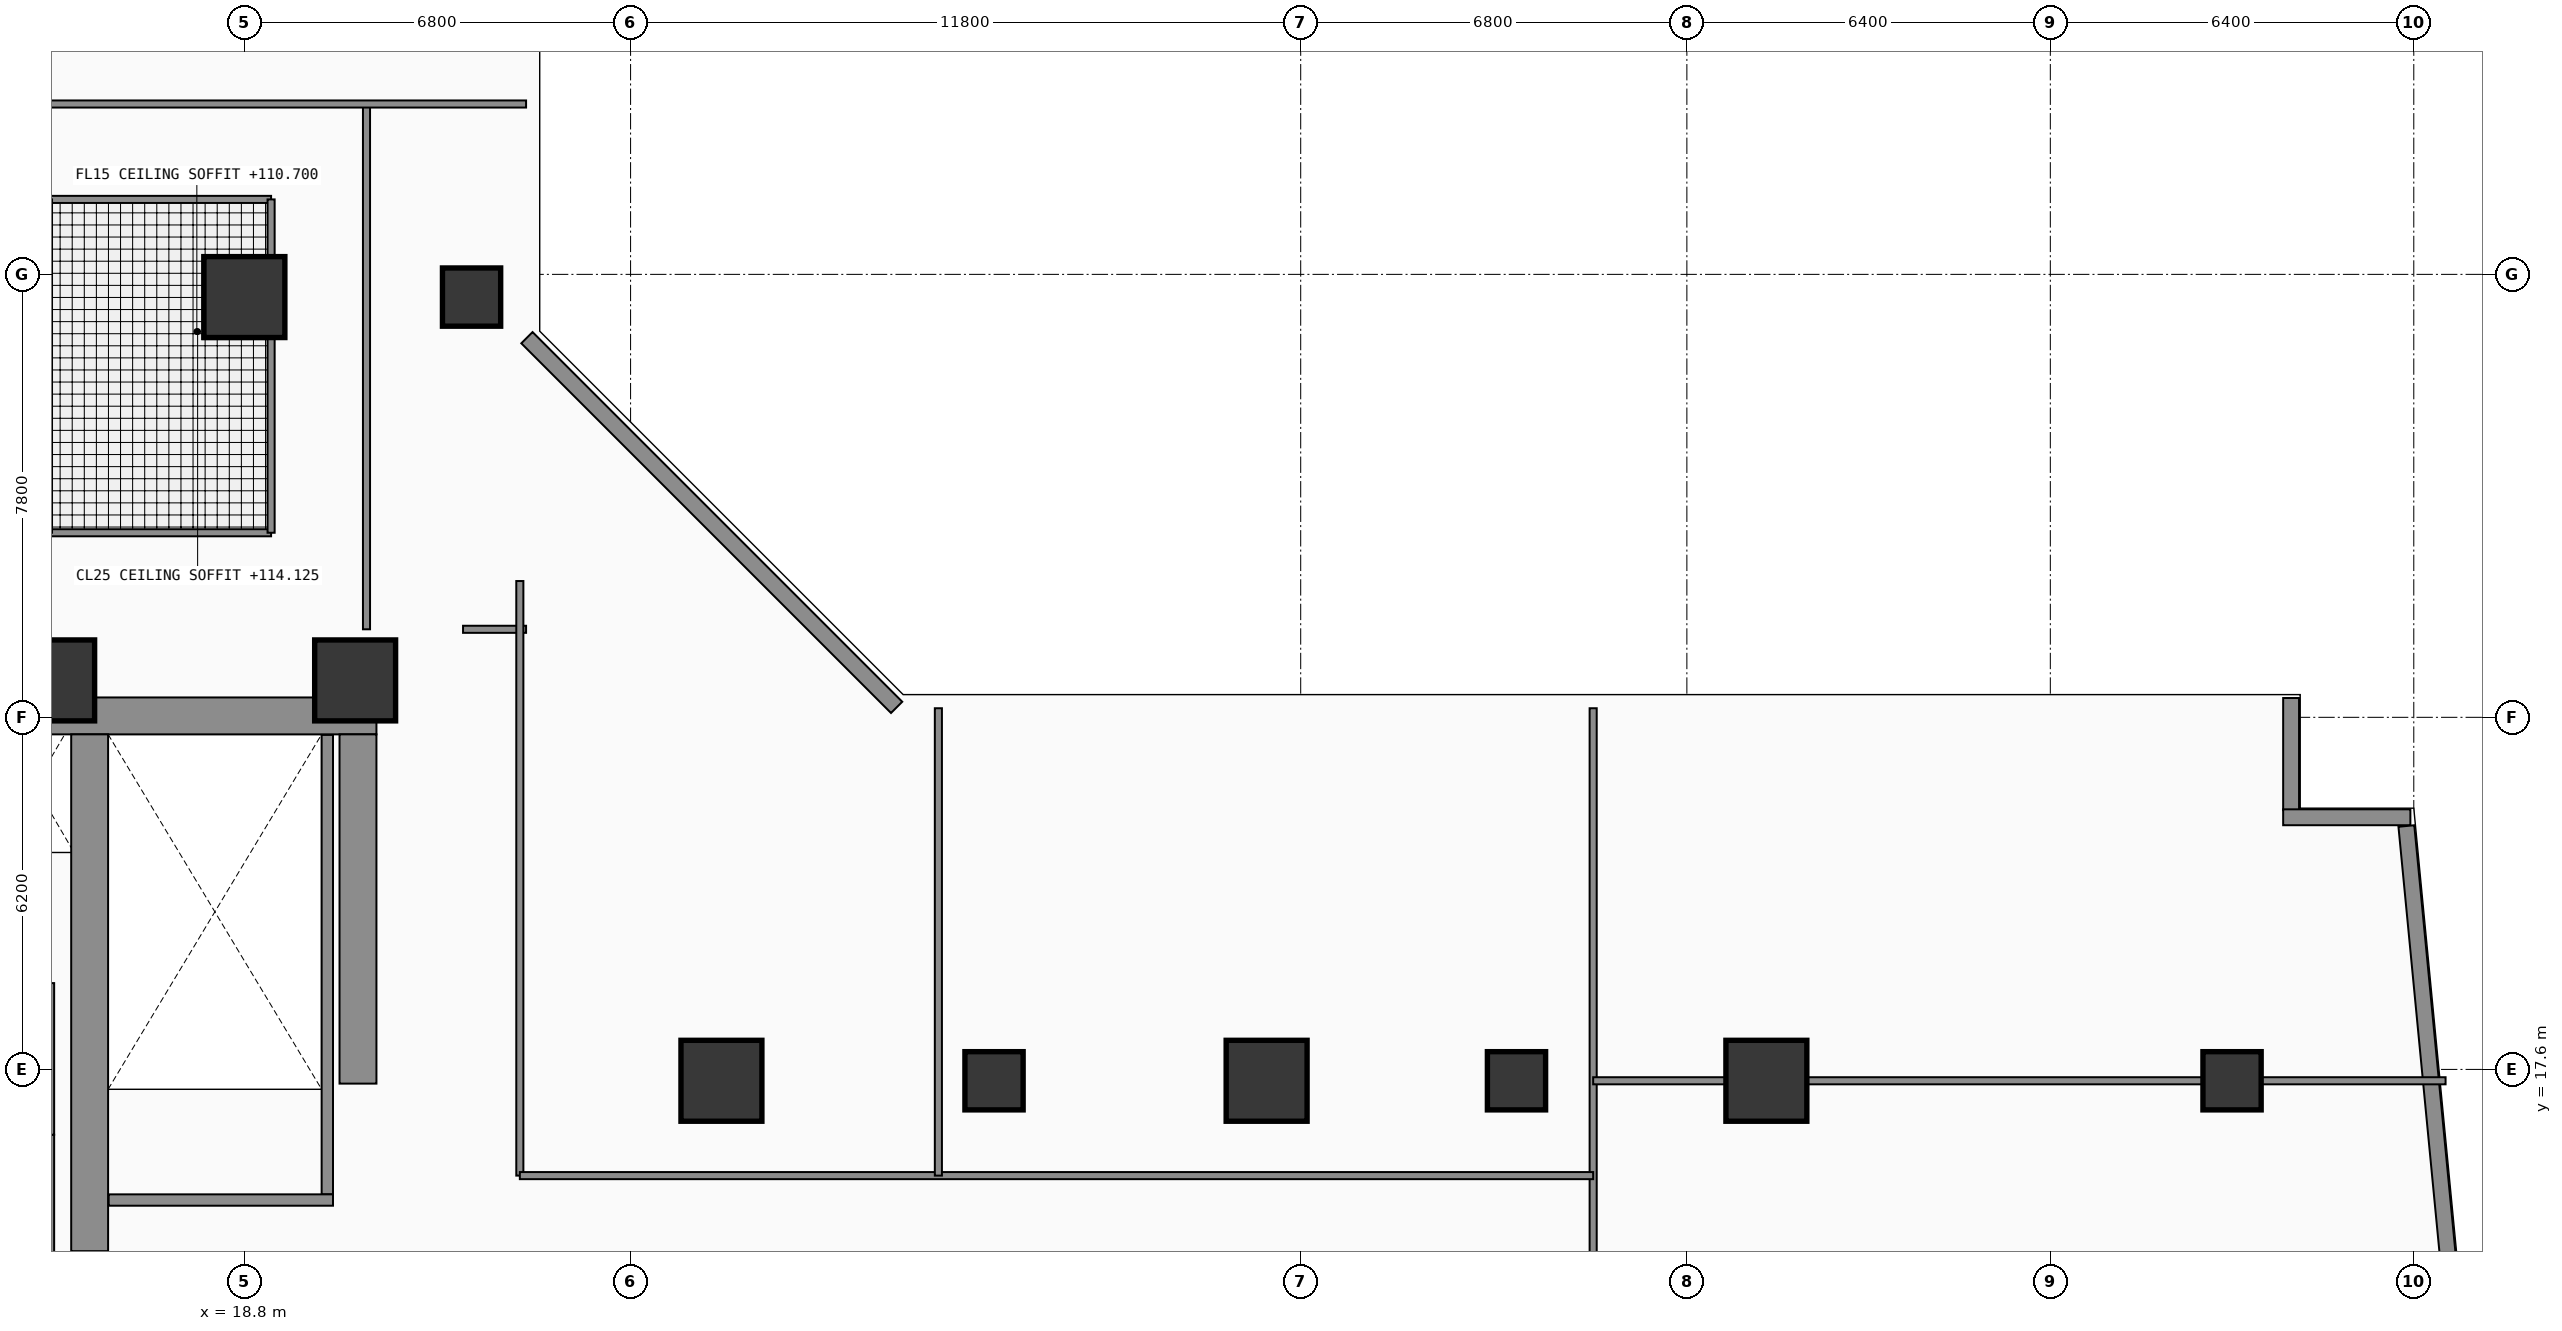
"""IFC4 building model, lengths in metres.
Left out: names, types, materials, properties, quantities, classifications, styles, units other than length and angle.
Written with IfcOpenShell. Run it as: python <this file> out.ifc"""

import sys

from ifc_helpers import new_model, si_unit, direction, frame, frame_2d, origin, origin_2d, place, context, subcontext, project, spatial, rectangle, extrude, element, fill, save


model = new_model("IFC4")
c1 = context("Model", 3, precision=1e-05, world=origin(), true_north=direction((0.0, 1.0)))
c2 = subcontext(c1, "Body", "Model", "MODEL_VIEW")
j1 = project(units=[si_unit("LENGTHUNIT", "METRE"), si_unit("PLANEANGLEUNIT", "RADIAN")], contexts=[c1])
p1 = place(None, origin())
s1 = spatial("IfcSite", under=j1, at=p1, CompositionType="ELEMENT")
p2 = place(p1, origin())
s2 = spatial("IfcBuilding", under=s1, at=p2, CompositionType="ELEMENT")
p3 = place(p2, frame((0.0, 0.0, 110.7)))
s3 = spatial("IfcBuildingStorey", under=s2, at=p3, CompositionType="ELEMENT", Elevation=110.7)
p4 = place(p3, frame((7.125, 23.825, 0.0), z_axis=(0.0, 0.0, 1.0), x_axis=(1.0, 0.0, 0.0)))
e1 = element("IfcWall", 1, at=p4, inside=s3, PredefinedType="SHEAR", context=c2, shape_type="SweptSolid", body=[
    extrude(rectangle(XDim=14.0, YDim=0.65, at=frame_2d((7.0, 0.0))), origin(), (0.0, 0.0, 1.0), 3.54),
])
p5 = place(p3, frame((20.8, 17.35, 0.0), z_axis=(0.0, 0.0, 1.0), x_axis=(0.0, 1.0, 0.0)))
e2 = element("IfcWall", 2, at=p5, inside=s3, PredefinedType="SHEAR", context=c2, shape_type="SweptSolid", body=[
    extrude(rectangle(XDim=6.15, YDim=0.65, at=frame_2d((3.075, 0.0))), origin(), (0.0, 0.0, 1.0), 3.54),
])
p6 = place(p3, frame((16.075, 14.4, 0.0), z_axis=(0.0, 0.0, 1.0), x_axis=(0.0, 1.0, 0.0)))
e3 = element("IfcWall", 3, at=p6, inside=s3, PredefinedType="SHEAR", context=c2, shape_type="SweptSolid", body=[
    extrude(rectangle(XDim=9.1, YDim=0.65, at=frame_2d((4.55, 0.0))), origin(), (0.0, 0.0, 1.0), 3.54),
])
for number, where, z_axis, x_axis in (
    (4, (15.45, 24.45, 0.0), (0.0, 0.0, 1.0), (1.0, 0.0, 0.0)),
    (5, (20.75, 24.45, 0.0), (0.0, 0.0, 1.0), (1.0, 0.0, 0.0)),
    (6, (18.8, 31.2, 0.0), (0.0, 0.0, 1.0), (1.0, 0.0, 0.0)),
    (7, (27.2, 17.4, 0.0), (0.0, 0.0, 1.0), (1.0, 0.0, 0.0)),
    (8, (36.8, 17.4, 0.0), (0.0, 0.0, 1.0), (1.0, 0.0, 0.0)),
    (9, (45.6, 17.4, 0.0), (0.0, 0.0, 1.0), (1.0, 0.0, 0.0)),
):
    element("IfcColumn", number, at=place(p3, frame(where, z_axis=z_axis, x_axis=x_axis)), inside=s3, PredefinedType="COLUMN", context=c2, shape_type="SweptSolid", body=[
        extrude(rectangle(XDim=1.4, YDim=1.4, at=origin_2d()), origin(), (0.0, 0.0, 1.0), 3.54),
    ])
for number, where, z_axis, x_axis in (
    (10, (53.8, 17.4, 0.0), (0.0, 0.0, 1.0), (1.0, 0.0, 0.0)),
    (11, (22.8, 31.2, 0.0), (0.0, 0.0, 1.0), (1.0, 0.0, 0.0)),
    (12, (32.0, 17.4, 0.0), (0.0, 0.0, 1.0), (1.0, 0.0, 0.0)),
    (13, (41.2, 17.4, 0.0), (0.0, 0.0, 1.0), (1.0, 0.0, 0.0)),
):
    element("IfcColumn", number, at=place(p3, frame(where, z_axis=z_axis, x_axis=x_axis)), inside=s3, PredefinedType="COLUMN", context=c2, shape_type="SweptSolid", body=[
        extrude(rectangle(XDim=1.0, YDim=1.0, at=origin_2d()), origin(), (0.0, 0.0, 1.0), 3.54),
    ])
p7 = place(p3, frame((54.84, 22.165, 0.0), z_axis=(0.0, 0.0, 1.0), x_axis=(0.0, 1.0, 0.0)))
e14 = element("IfcWall", 14, at=p7, inside=s3, PredefinedType="SOLIDWALL", context=c2, shape_type="SweptSolid", body=[
    extrude(rectangle(XDim=1.975, YDim=0.28, at=frame_2d((0.987, 0.0))), origin(), (0.0, 0.0, 1.0), 3.54),
])
p8 = place(p3, frame((54.7, 22.04, 0.0), z_axis=(0.0, 0.0, 1.0), x_axis=(1.0, 0.0, 0.0)))
e15 = element("IfcWall", 15, at=p8, inside=s3, PredefinedType="SOLIDWALL", context=c2, shape_type="SweptSolid", body=[
    extrude(rectangle(XDim=2.24, YDim=0.28, at=frame_2d((1.12, 0.0))), origin(), (0.0, 0.0, 1.0), 3.54),
])
p9 = place(p3, frame((30.285, 23.975, 0.0), z_axis=(0.0, 0.0, 1.0), x_axis=(-0.707106781187, 0.707106781187, 0.0)))
e16 = element("IfcWall", 16, at=p9, inside=s3, PredefinedType="SOLIDWALL", context=c2, shape_type="SweptSolid", body=[
    extrude(rectangle(XDim=9.207, YDim=0.28, at=frame_2d((4.603, 0.0))), origin(), (0.0, 0.0, 1.0), 3.54),
])
p10 = place(p3, frame((57.639, 13.905, 0.0), z_axis=(0.0, 0.0, 1.0), x_axis=(-0.095969995245, 0.995384227328, 0.0)))
e17 = element("IfcWall", 17, at=p10, inside=s3, PredefinedType="SOLIDWALL", context=c2, shape_type="SweptSolid", body=[
    extrude(rectangle(XDim=8.019, YDim=0.28, at=frame_2d((4.009, 0.0))), origin(), (0.0, 0.0, 1.0), 3.54),
])
p11 = place(p3, frame((20.26, 15.4, 0.0), z_axis=(0.0, 0.0, 1.0), x_axis=(0.0, 1.0, 0.0)))
e18 = element("IfcWall", 18, at=p11, inside=s3, PredefinedType="SHEAR", context=c2, shape_type="SweptSolid", body=[
    extrude(rectangle(XDim=8.09, YDim=0.2, at=frame_2d((4.045, 0.0))), origin(), (0.0, 0.0, 1.0), 3.54),
])
p12 = place(p3, frame((16.41, 15.3, 0.0), z_axis=(0.0, 0.0, 1.0), x_axis=(1.0, 0.0, 0.0)))
e19 = element("IfcWall", 19, at=p12, inside=s3, PredefinedType="PARTITIONING", context=c2, shape_type="SweptSolid", body=[
    extrude(rectangle(XDim=3.95, YDim=0.2, at=frame_2d((1.975, 0.0))), origin(), (0.0, 0.0, 1.0), 3.54),
])
p13 = place(p12, frame((1.294, 0.0, 0.0)))
e20 = element("IfcOpeningElement", 20, at=p13, cuts=e19, PredefinedType="OPENING", context=c2, shape_type="SweptSolid", body=[
    extrude(rectangle(XDim=1.1, YDim=2.2, at=frame_2d((0.55, 1.1))), frame((0.0, 0.11, 0.0), z_axis=(0.0, -1.0, 0.0), x_axis=(1.0, 0.0, 0.0)), (0.0, 0.0, 1.0), 0.22),
])
p14 = place(p3, frame((15.35, 14.22, 0.0), z_axis=(0.0, 0.0, 1.0), x_axis=(0.0, 1.0, 0.0)))
e21 = element("IfcWall", 21, at=p14, inside=s3, PredefinedType="PARTITIONING", context=c2, shape_type="SweptSolid", body=[
    extrude(rectangle(XDim=2.23, YDim=0.2, at=frame_2d((1.115, 0.0))), origin(), (0.0, 0.0, 1.0), 3.54),
])
p15 = place(p3, frame((15.35, 16.45, 0.0), z_axis=(0.0, 0.0, 1.0), x_axis=(0.0, 1.0, 0.0)))
e22 = element("IfcWall", 22, at=p15, inside=s3, PredefinedType="PARTITIONING", context=c2, shape_type="SweptSolid", body=[
    extrude(rectangle(XDim=2.67, YDim=0.2, at=frame_2d((1.335, 0.0))), origin(), (0.0, 0.0, 1.0), 3.54),
])
for number, where, z_axis, x_axis in (
    (23, (15.35, 27.05, 0.0), (0.0, 0.0, 1.0), (1.0, 0.0, 0.0)),
    (24, (15.35, 32.92, 0.0), (0.0, 0.0, 1.0), (1.0, 0.0, 0.0)),
):
    element("IfcWall", number, at=place(p3, frame(where, z_axis=z_axis, x_axis=x_axis)), inside=s3, PredefinedType="PARTITIONING", context=c2, shape_type="SweptSolid", body=[
        extrude(rectangle(XDim=3.92, YDim=0.125, at=frame_2d((1.96, 0.0))), origin(), (0.0, 0.0, 1.0), 3.54),
    ])
p16 = place(p3, frame((19.27, 27.05, 0.0), z_axis=(0.0, 0.0, 1.0), x_axis=(0.0, 1.0, 0.0)))
e25 = element("IfcWall", 25, at=p16, inside=s3, PredefinedType="PARTITIONING", context=c2, shape_type="SweptSolid", body=[
    extrude(rectangle(XDim=5.87, YDim=0.125, at=frame_2d((2.935, 0.0))), origin(), (0.0, 0.0, 1.0), 3.54),
])
p17 = place(p16, frame((2.106, 0.0, 0.0)))
e26 = element("IfcOpeningElement", 26, at=p17, cuts=e25, PredefinedType="OPENING", context=c2, shape_type="SweptSolid", body=[
    extrude(rectangle(XDim=0.95, YDim=2.15, at=frame_2d((0.475, 1.075))), frame((0.0, 0.073, 0.0), z_axis=(0.0, -1.0, 0.0), x_axis=(1.0, 0.0, 0.0)), (0.0, 0.0, 1.0), 0.145),
])
p18 = place(p3, frame((20.95, 25.35, 0.0), z_axis=(0.0, 0.0, 1.0), x_axis=(0.0, 1.0, 0.0)))
e27 = element("IfcWall", 27, at=p18, inside=s3, PredefinedType="PARTITIONING", context=c2, shape_type="SweptSolid", body=[
    extrude(rectangle(XDim=9.25, YDim=0.125, at=frame_2d((4.625, 0.0))), origin(), (0.0, 0.0, 1.0), 3.54),
])
p19 = place(p18, frame((3.833, 0.0, 0.0)))
e28 = element("IfcOpeningElement", 28, at=p19, cuts=e27, PredefinedType="OPENING", context=c2, shape_type="SweptSolid", body=[
    extrude(rectangle(XDim=0.85, YDim=2.15, at=frame_2d((0.425, 1.075))), frame((0.0, 0.073, 0.0), z_axis=(0.0, -1.0, 0.0), x_axis=(1.0, 0.0, 0.0)), (0.0, 0.0, 1.0), 0.145),
])
p20 = place(p3, frame((22.65, 25.35, 0.0), z_axis=(0.0, 0.0, 1.0), x_axis=(1.0, 0.0, 0.0)))
e29 = element("IfcWall", 29, at=p20, inside=s3, PredefinedType="PARTITIONING", context=c2, shape_type="SweptSolid", body=[
    extrude(rectangle(XDim=1.11, YDim=0.125, at=frame_2d((0.555, 0.0))), origin(), (0.0, 0.0, 1.0), 3.54),
])
p21 = place(p3, frame((11.98, 34.6, 0.0), z_axis=(0.0, 0.0, 1.0), x_axis=(1.0, 0.0, 0.0)))
e30 = element("IfcWall", 30, at=p21, inside=s3, PredefinedType="PARTITIONING", context=c2, shape_type="SweptSolid", body=[
    extrude(rectangle(XDim=11.78, YDim=0.125, at=frame_2d((5.89, 0.0))), origin(), (0.0, 0.0, 1.0), 3.54),
])
p22 = place(p3, frame((42.55, 3.84, 0.0), z_axis=(0.0, 0.0, 1.0), x_axis=(0.0, 1.0, 0.0)))
e31 = element("IfcWall", 31, at=p22, inside=s3, PredefinedType="PARTITIONING", context=c2, shape_type="SweptSolid", body=[
    extrude(rectangle(XDim=20.12, YDim=0.125, at=frame_2d((10.06, 0.0))), origin(), (0.0, 0.0, 1.0), 3.54),
])
p23 = place(p22, frame((10.5, 0.0, 0.0)))
e32 = element("IfcOpeningElement", 32, at=p23, cuts=e31, PredefinedType="OPENING", context=c2, shape_type="SweptSolid", body=[
    extrude(rectangle(XDim=1.0, YDim=2.2, at=frame_2d((0.5, 1.1))), frame((0.0, 0.073, 0.0), z_axis=(0.0, -1.0, 0.0), x_axis=(1.0, 0.0, 0.0)), (0.0, 0.0, 1.0), 0.145),
])
p24 = place(p3, frame((42.55, 17.4, 0.0), z_axis=(0.0, 0.0, 1.0), x_axis=(1.0, 0.0, 0.0)))
e33 = element("IfcWall", 33, at=p24, inside=s3, PredefinedType="PARTITIONING", context=c2, shape_type="SweptSolid", body=[
    extrude(rectangle(XDim=15.01, YDim=0.125, at=frame_2d((7.505, 0.0))), origin(), (0.0, 0.0, 1.0), 3.24),
])
p25 = place(p24, frame((4.244, 0.0, 0.0)))
e34 = element("IfcOpeningElement", 34, at=p25, cuts=e33, PredefinedType="OPENING", context=c2, shape_type="SweptSolid", body=[
    extrude(rectangle(XDim=0.95, YDim=2.15, at=frame_2d((0.475, 1.075))), frame((0.0, 0.073, 0.0), z_axis=(0.0, -1.0, 0.0), x_axis=(1.0, 0.0, 0.0)), (0.0, 0.0, 1.0), 0.145),
])
p26 = place(p3, frame((23.65, 15.73, 0.0), z_axis=(0.0, 0.0, 1.0), x_axis=(0.0, 1.0, 0.0)))
e35 = element("IfcWall", 35, at=p26, inside=s3, PredefinedType="PARTITIONING", context=c2, shape_type="SweptSolid", body=[
    extrude(rectangle(XDim=10.47, YDim=0.125, at=frame_2d((5.235, 0.0))), origin(), (0.0, 0.0, 1.0), 3.54),
])
p27 = place(p3, frame((23.65, 15.73, 0.0), z_axis=(0.0, 0.0, 1.0), x_axis=(1.0, 0.0, 0.0)))
e36 = element("IfcWall", 36, at=p27, inside=s3, PredefinedType="PARTITIONING", context=c2, shape_type="SweptSolid", body=[
    extrude(rectangle(XDim=18.9, YDim=0.125, at=frame_2d((9.45, 0.0))), origin(), (0.0, 0.0, 1.0), 3.09),
])
p28 = place(p27, frame((4.615, 0.0, 0.0)))
e37 = element("IfcOpeningElement", 37, at=p28, cuts=e36, PredefinedType="OPENING", context=c2, shape_type="SweptSolid", body=[
    extrude(rectangle(XDim=0.95, YDim=2.15, at=frame_2d((0.475, 1.075))), frame((0.0, 0.073, 0.0), z_axis=(0.0, -1.0, 0.0), x_axis=(1.0, 0.0, 0.0)), (0.0, 0.0, 1.0), 0.145),
])
p29 = place(p27, frame((14.29, 0.0, 0.0)))
e38 = element("IfcOpeningElement", 38, at=p29, cuts=e36, PredefinedType="OPENING", context=c2, shape_type="SweptSolid", body=[
    extrude(rectangle(XDim=0.95, YDim=2.15, at=frame_2d((0.475, 1.075))), frame((0.0, 0.073, 0.0), z_axis=(0.0, -1.0, 0.0), x_axis=(1.0, 0.0, 0.0)), (0.0, 0.0, 1.0), 0.145),
])
p30 = place(p3, frame((31.02, 15.73, 0.0), z_axis=(0.0, 0.0, 1.0), x_axis=(0.0, 1.0, 0.0)))
e39 = element("IfcWall", 39, at=p30, inside=s3, PredefinedType="PARTITIONING", context=c2, shape_type="SweptSolid", body=[
    extrude(rectangle(XDim=8.23, YDim=0.125, at=frame_2d((4.115, 0.0))), origin(), (0.0, 0.0, 1.0), 3.54),
])
p31 = place(p13, origin())
e40 = element("IfcDoor", 40, at=p31, inside=s3, OperationType="SINGLE_SWING_LEFT", PredefinedType="DOOR", context=c2, shape_type="SweptSolid", body=[
    extrude(rectangle(XDim=1.1, YDim=2.2, at=frame_2d((0.55, 1.1))), frame((0.0, 0.025, 0.0), z_axis=(0.0, -1.0, 0.0), x_axis=(1.0, 0.0, 0.0)), (0.0, 0.0, 1.0), 0.05),
])
fill(e20, e40)
p32 = place(p17, origin())
e41 = element("IfcDoor", 41, at=p32, inside=s3, OperationType="SINGLE_SWING_RIGHT", PredefinedType="DOOR", context=c2, shape_type="SweptSolid", body=[
    extrude(rectangle(XDim=0.95, YDim=2.15, at=frame_2d((0.475, 1.075))), frame((0.0, 0.025, 0.0), z_axis=(0.0, -1.0, 0.0), x_axis=(1.0, 0.0, 0.0)), (0.0, 0.0, 1.0), 0.05),
])
fill(e26, e41)
p33 = place(p19, origin())
e42 = element("IfcDoor", 42, at=p33, inside=s3, OperationType="SINGLE_SWING_RIGHT", PredefinedType="DOOR", context=c2, shape_type="SweptSolid", body=[
    extrude(rectangle(XDim=0.85, YDim=2.15, at=frame_2d((0.425, 1.075))), frame((0.0, 0.025, 0.0), z_axis=(0.0, -1.0, 0.0), x_axis=(1.0, 0.0, 0.0)), (0.0, 0.0, 1.0), 0.05),
])
fill(e28, e42)
p34 = place(p23, origin())
e43 = element("IfcDoor", 43, at=p34, inside=s3, OperationType="SINGLE_SWING_RIGHT", PredefinedType="DOOR", context=c2, shape_type="SweptSolid", body=[
    extrude(rectangle(XDim=1.0, YDim=2.2, at=frame_2d((0.5, 1.1))), frame((0.0, 0.025, 0.0), z_axis=(0.0, -1.0, 0.0), x_axis=(1.0, 0.0, 0.0)), (0.0, 0.0, 1.0), 0.05),
])
fill(e32, e43)
p35 = place(p25, origin())
e44 = element("IfcDoor", 44, at=p35, inside=s3, OperationType="SINGLE_SWING_LEFT", PredefinedType="DOOR", context=c2, shape_type="SweptSolid", body=[
    extrude(rectangle(XDim=0.95, YDim=2.15, at=frame_2d((0.475, 1.075))), frame((0.0, 0.025, 0.0), z_axis=(0.0, -1.0, 0.0), x_axis=(1.0, 0.0, 0.0)), (0.0, 0.0, 1.0), 0.05),
])
fill(e34, e44)
p36 = place(p28, origin())
e45 = element("IfcDoor", 45, at=p36, inside=s3, OperationType="SINGLE_SWING_RIGHT", PredefinedType="DOOR", context=c2, shape_type="SweptSolid", body=[
    extrude(rectangle(XDim=0.95, YDim=2.15, at=frame_2d((0.475, 1.075))), frame((0.0, 0.025, 0.0), z_axis=(0.0, -1.0, 0.0), x_axis=(1.0, 0.0, 0.0)), (0.0, 0.0, 1.0), 0.05),
])
fill(e37, e45)
p37 = place(p29, origin())
e46 = element("IfcDoor", 46, at=p37, inside=s3, OperationType="SINGLE_SWING_LEFT", PredefinedType="DOOR", context=c2, shape_type="SweptSolid", body=[
    extrude(rectangle(XDim=0.95, YDim=2.15, at=frame_2d((0.475, 1.075))), frame((0.0, 0.025, 0.0), z_axis=(0.0, -1.0, 0.0), x_axis=(1.0, 0.0, 0.0)), (0.0, 0.0, 1.0), 0.05),
])
fill(e38, e46)
save(model, sys.argv[1])
